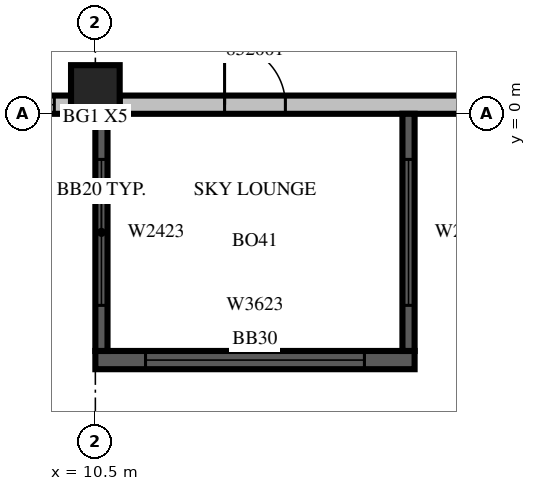
"""IFC4 building model, lengths in metres.
Left out: names, types, materials, properties, quantities, classifications, styles, units other than length and angle.
Written with IfcOpenShell. Run it as: python <this file> out.ifc"""

import sys

from ifc_helpers import new_model, si_unit, direction, frame, frame_2d, origin, origin_2d, place, context, subcontext, project, spatial, rectangle, extrude, source, transform, mapped, element, fill, save


model = new_model("IFC4")
c1 = context("Model", 3, precision=1e-05, world=origin(), true_north=direction((0.0, 1.0)))
c2 = subcontext(c1, "Body", "Model", "MODEL_VIEW")
j1 = project(units=[si_unit("LENGTHUNIT", "METRE"), si_unit("PLANEANGLEUNIT", "RADIAN")], contexts=[c1])
p1 = place(None, origin())
s1 = spatial("IfcSite", under=j1, at=p1, CompositionType="ELEMENT")
p2 = place(p1, origin())
s2 = spatial("IfcBuilding", under=s1, at=p2, CompositionType="ELEMENT")
p3 = place(p2, frame((0.0, 0.0, 231.0)))
s3 = spatial("IfcBuildingStorey", under=s2, at=p3, CompositionType="ELEMENT", Elevation=231.0)
m1 = source(origin(), c2, "Body", "SweptSolid", [
    extrude(rectangle(XDim=0.8, YDim=0.8, at=origin_2d()), origin(), (0.0, 0.0, 1.0), 3.8),
])
p4 = place(p3, frame((10.5, 0.4, 0.0), z_axis=(0.0, 0.0, 1.0), x_axis=(1.0, 0.0, 0.0)))
e1 = element("IfcColumn", 1, at=p4, inside=s3, PredefinedType="COLUMN", context=c2, shape_type="MappedRepresentation", body=[
    mapped(m1, transform((0.0, 0.0, 0.0), scale=1.0)),
])
p5 = place(p3, frame((7.35, 0.15, 0.0), z_axis=(0.0, 0.0, 1.0), x_axis=(1.0, 0.0, 0.0)))
e2 = element("IfcWall", 2, at=p5, inside=s3, PredefinedType="STANDARD", context=c2, shape_type="SweptSolid", body=[
    extrude(rectangle(XDim=2.75, YDim=0.3, at=frame_2d((1.375, 0.0))), origin(), (0.0, 0.0, 1.0), 3.4),
])
m2 = source(origin(), c2, "Body", "SweptSolid", [
    extrude(rectangle(XDim=1.8, YDim=2.3, at=frame_2d((0.9, 1.15))), frame((0.0, 0.16, 0.0), z_axis=(0.0, -1.0, 0.0), x_axis=(1.0, 0.0, 0.0)), (0.0, 0.0, 1.0), 0.32),
])
p6 = place(p5, frame((0.675, 0.0, 0.6)))
e3 = element("IfcOpeningElement", 3, at=p6, cuts=e2, PredefinedType="OPENING", context=c2, shape_type="MappedRepresentation", body=[
    mapped(m2, transform((0.0, 0.0, 0.0), scale=1.0)),
])
p7 = place(p3, frame((10.9, 0.15, 0.0), z_axis=(0.0, 0.0, 1.0), x_axis=(1.0, 0.0, 0.0)))
e4 = element("IfcWall", 4, at=p7, inside=s3, PredefinedType="STANDARD", context=c2, shape_type="SweptSolid", body=[
    extrude(rectangle(XDim=9.7, YDim=0.3, at=frame_2d((4.85, 0.0))), origin(), (0.0, 0.0, 1.0), 3.4),
])
m3 = source(origin(), c2, "Body", "SweptSolid", [
    extrude(rectangle(XDim=3.6, YDim=2.3, at=frame_2d((1.8, 1.15))), frame((0.0, 0.16, 0.0), z_axis=(0.0, -1.0, 0.0), x_axis=(1.0, 0.0, 0.0)), (0.0, 0.0, 1.0), 0.32),
])
p8 = place(p7, frame((5.675, 0.0, 0.6)))
e5 = element("IfcOpeningElement", 5, at=p8, cuts=e4, PredefinedType="OPENING", context=c2, shape_type="MappedRepresentation", body=[
    mapped(m3, transform((0.0, 0.0, 0.0), scale=1.0)),
])
m4 = source(origin(), c2, "Body", "SweptSolid", [
    extrude(rectangle(XDim=1.0, YDim=2.1, at=frame_2d((0.5, 1.05))), frame((0.0, 0.16, 0.0), z_axis=(0.0, -1.0, 0.0), x_axis=(1.0, 0.0, 0.0)), (0.0, 0.0, 1.0), 0.32),
])
p9 = place(p7, frame((1.725, 0.0, 0.0)))
e6 = element("IfcOpeningElement", 6, at=p9, cuts=e4, PredefinedType="OPENING", context=c2, shape_type="MappedRepresentation", body=[
    mapped(m4, transform((0.0, 0.0, 0.0), scale=1.0)),
])
m5 = source(origin(), c2, "Body", "SweptSolid", [
    extrude(rectangle(XDim=5.25, YDim=0.3, at=frame_2d((2.625, 0.0))), origin(), (0.0, 0.0, 1.0), 3.39),
])
p10 = place(p3, frame((10.5, -4.05, 0.0), z_axis=(0.0, 0.0, 1.0), x_axis=(1.0, 0.0, 0.0)))
e7 = element("IfcWall", 7, at=p10, inside=s3, PredefinedType="SOLIDWALL", context=c2, shape_type="MappedRepresentation", body=[
    mapped(m5, transform((0.0, 0.0, 0.0), scale=1.0)),
])
p11 = place(p10, frame((0.825, 0.0, 0.6)))
e8 = element("IfcOpeningElement", 8, at=p11, cuts=e7, PredefinedType="OPENING", context=c2, shape_type="MappedRepresentation", body=[
    mapped(m3, transform((0.0, 0.0, 0.0), scale=1.0)),
])
m6 = source(origin(), c2, "Body", "SweptSolid", [
    extrude(rectangle(XDim=3.9, YDim=0.2, at=frame_2d((1.95, 0.0))), origin(), (0.0, 0.0, 1.0), 3.39),
])
p12 = place(p3, frame((10.6, 0.0, 0.0), z_axis=(0.0, 0.0, 1.0), x_axis=(0.0, -1.0, 0.0)))
e9 = element("IfcWall", 9, at=p12, inside=s3, PredefinedType="SOLIDWALL", context=c2, shape_type="MappedRepresentation", body=[
    mapped(m6, transform((0.0, 0.0, 0.0), scale=1.0)),
])
m7 = source(origin(), c2, "Body", "SweptSolid", [
    extrude(rectangle(XDim=2.4, YDim=2.3, at=frame_2d((1.2, 1.15))), frame((0.0, 0.11, 0.0), z_axis=(0.0, -1.0, 0.0), x_axis=(1.0, 0.0, 0.0)), (0.0, 0.0, 1.0), 0.22),
])
p13 = place(p12, frame((0.75, 0.0, 0.6)))
e10 = element("IfcOpeningElement", 10, at=p13, cuts=e9, PredefinedType="OPENING", context=c2, shape_type="MappedRepresentation", body=[
    mapped(m7, transform((0.0, 0.0, 0.0), scale=1.0)),
])
p14 = place(p3, frame((15.65, 0.0, 0.0), z_axis=(0.0, 0.0, 1.0), x_axis=(0.0, -1.0, 0.0)))
e11 = element("IfcWall", 11, at=p14, inside=s3, PredefinedType="SOLIDWALL", context=c2, shape_type="MappedRepresentation", body=[
    mapped(m6, transform((0.0, 0.0, 0.0), scale=1.0)),
])
p15 = place(p14, frame((0.75, 0.0, 0.6)))
e12 = element("IfcOpeningElement", 12, at=p15, cuts=e11, PredefinedType="OPENING", context=c2, shape_type="MappedRepresentation", body=[
    mapped(m7, transform((0.0, 0.0, 0.0), scale=1.0)),
])
m8 = source(origin(), c2, "Body", "SweptSolid", [
    extrude(rectangle(XDim=1.8, YDim=2.3, at=frame_2d((0.9, 1.15))), frame((0.0, 0.03, 0.0), z_axis=(0.0, -1.0, 0.0), x_axis=(1.0, 0.0, 0.0)), (0.0, 0.0, 1.0), 0.06),
])
p16 = place(p6, origin())
e13 = element("IfcWindow", 13, at=p16, inside=s3, PartitioningType="SINGLE_PANEL", PredefinedType="WINDOW", context=c2, shape_type="MappedRepresentation", body=[
    mapped(m8, transform((0.0, 0.0, 0.0), scale=1.0)),
])
fill(e3, e13)
m9 = source(origin(), c2, "Body", "SweptSolid", [
    extrude(rectangle(XDim=3.6, YDim=2.3, at=frame_2d((1.8, 1.15))), frame((0.0, 0.03, 0.0), z_axis=(0.0, -1.0, 0.0), x_axis=(1.0, 0.0, 0.0)), (0.0, 0.0, 1.0), 0.06),
])
p17 = place(p11, origin())
e14 = element("IfcWindow", 14, at=p17, inside=s3, PartitioningType="SINGLE_PANEL", PredefinedType="WINDOW", context=c2, shape_type="MappedRepresentation", body=[
    mapped(m9, transform((0.0, 0.0, 0.0), scale=1.0)),
])
fill(e8, e14)
m10 = source(origin(), c2, "Body", "SweptSolid", [
    extrude(rectangle(XDim=2.4, YDim=2.3, at=frame_2d((1.2, 1.15))), frame((0.0, 0.03, 0.0), z_axis=(0.0, -1.0, 0.0), x_axis=(1.0, 0.0, 0.0)), (0.0, 0.0, 1.0), 0.06),
])
p18 = place(p13, origin())
e15 = element("IfcWindow", 15, at=p18, inside=s3, PartitioningType="SINGLE_PANEL", PredefinedType="WINDOW", context=c2, shape_type="MappedRepresentation", body=[
    mapped(m10, transform((0.0, 0.0, 0.0), scale=1.0)),
])
fill(e10, e15)
p19 = place(p15, origin())
e16 = element("IfcWindow", 16, at=p19, inside=s3, PartitioningType="SINGLE_PANEL", PredefinedType="WINDOW", context=c2, shape_type="MappedRepresentation", body=[
    mapped(m10, transform((0.0, 0.0, 0.0), scale=1.0)),
])
fill(e12, e16)
m11 = source(origin(), c2, "Body", "SweptSolid", [
    extrude(rectangle(XDim=1.0, YDim=2.1, at=frame_2d((0.5, 1.05))), frame((0.0, 0.025, 0.0), z_axis=(0.0, -1.0, 0.0), x_axis=(1.0, 0.0, 0.0)), (0.0, 0.0, 1.0), 0.05),
])
p20 = place(p9, origin())
e17 = element("IfcDoor", 17, at=p20, inside=s3, OperationType="SINGLE_SWING_LEFT", PredefinedType="DOOR", context=c2, shape_type="MappedRepresentation", body=[
    mapped(m11, transform((0.0, 0.0, 0.0), scale=1.0)),
])
fill(e6, e17)
save(model, sys.argv[1])
